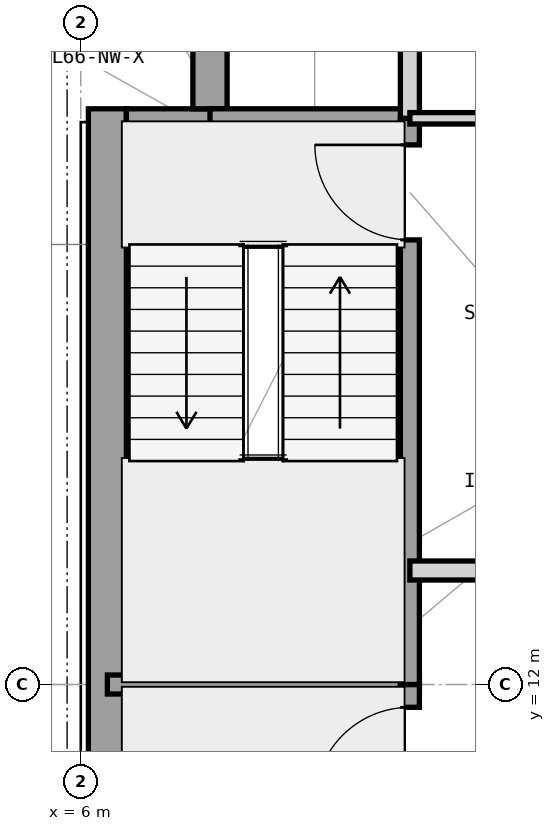
"""IFC4 building model, lengths in metres.
Left out: names, types, materials, properties, quantities, classifications, styles, units other than length and angle.
Written with IfcOpenShell. Run it as: python <this file> out.ifc"""

import sys

from ifc_helpers import new_model, si_unit, direction, frame, frame_2d, origin, place, context, subcontext, project, spatial, rectangle, extrude, element, fill, save


model = new_model("IFC4")
c1 = context("Model", 3, precision=1e-05, world=origin(), true_north=direction((0.0, 1.0)))
c2 = subcontext(c1, "Body", "Model", "MODEL_VIEW")
j1 = project(units=[si_unit("LENGTHUNIT", "METRE"), si_unit("PLANEANGLEUNIT", "RADIAN")], contexts=[c1])
p1 = place(None, origin())
s1 = spatial("IfcSite", under=j1, at=p1, CompositionType="ELEMENT")
p2 = place(p1, origin())
s2 = spatial("IfcBuilding", under=s1, at=p2, CompositionType="ELEMENT")
p3 = place(p2, frame((0.0, 0.0, 270.3)))
s3 = spatial("IfcBuildingStorey", under=s2, at=p3, CompositionType="ELEMENT", Elevation=270.3)
p4 = place(p3, frame((6.35, 4.425, 0.0), z_axis=(0.0, 0.0, 1.0), x_axis=(0.0, 1.0, 0.0)))
e1 = element("IfcWall", 1, at=p4, inside=s3, PredefinedType="SHEAR", context=c2, shape_type="SweptSolid", body=[
    extrude(rectangle(XDim=15.15, YDim=0.5, at=frame_2d((7.575, 0.0))), origin(), (0.0, 0.0, 1.0), 3.9),
])
p5 = place(p3, frame((6.6, 19.35, 0.0), z_axis=(0.0, 0.0, 1.0), x_axis=(1.0, 0.0, 0.0)))
e2 = element("IfcWall", 2, at=p5, inside=s3, PredefinedType="SHEAR", context=c2, shape_type="SweptSolid", body=[
    extrude(rectangle(XDim=1.325, YDim=0.45, at=frame_2d((0.663, 0.0))), origin(), (0.0, 0.0, 1.0), 3.9),
])
p6 = place(p3, frame((7.7, 19.575, 0.0), z_axis=(0.0, 0.0, 1.0), x_axis=(0.0, 1.0, 0.0)))
e3 = element("IfcWall", 3, at=p6, inside=s3, PredefinedType="SHEAR", context=c2, shape_type="SweptSolid", body=[
    extrude(rectangle(XDim=0.825, YDim=0.45, at=frame_2d((0.413, 0.0))), origin(), (0.0, 0.0, 1.0), 3.9),
])
p7 = place(p3, frame((6.35, 12.0, 0.0), z_axis=(0.0, 0.0, 1.0), x_axis=(1.0, 0.0, 0.0)))
e4 = element("IfcWall", 4, at=p7, inside=s3, PredefinedType="SHEAR", context=c2, shape_type="SweptSolid", body=[
    extrude(rectangle(XDim=4.105, YDim=0.25, at=frame_2d((2.052, 0.0))), origin(), (0.0, 0.0, 1.0), 3.9),
])
p8 = place(p3, frame((7.7, 19.45, 0.0), z_axis=(0.0, 0.0, 1.0), x_axis=(1.0, 0.0, 0.0)))
e5 = element("IfcWall", 5, at=p8, inside=s3, PredefinedType="SHEAR", context=c2, shape_type="SweptSolid", body=[
    extrude(rectangle(XDim=2.755, YDim=0.25, at=frame_2d((1.377, 0.0))), origin(), (0.0, 0.0, 1.0), 3.9),
])
p9 = place(p3, frame((10.33, 4.55, 0.0), z_axis=(0.0, 0.0, 1.0), x_axis=(0.0, 1.0, 0.0)))
e6 = element("IfcWall", 6, at=p9, inside=s3, PredefinedType="SHEAR", context=c2, shape_type="SweptSolid", body=[
    extrude(rectangle(XDim=7.45, YDim=0.25, at=frame_2d((3.725, 0.0))), origin(), (0.0, 0.0, 1.0), 3.9),
])
p10 = place(p9, frame((5.9, 0.0, 0.0)))
e7 = element("IfcOpeningElement", 7, at=p10, cuts=e6, PredefinedType="OPENING", context=c2, shape_type="SweptSolid", body=[
    extrude(rectangle(XDim=1.25, YDim=2.2, at=frame_2d((0.625, 1.1))), frame((0.0, 0.135, 0.0), z_axis=(0.0, -1.0, 0.0), x_axis=(1.0, 0.0, 0.0)), (0.0, 0.0, 1.0), 0.27),
])
p11 = place(p3, frame((10.33, 12.0, 0.0), z_axis=(0.0, 0.0, 1.0), x_axis=(0.0, 1.0, 0.0)))
e8 = element("IfcWall", 8, at=p11, inside=s3, PredefinedType="SHEAR", context=c2, shape_type="SweptSolid", body=[
    extrude(rectangle(XDim=7.45, YDim=0.25, at=frame_2d((3.725, 0.0))), origin(), (0.0, 0.0, 1.0), 3.9),
])
p12 = place(p11, frame((5.85, 0.0, 0.0)))
e9 = element("IfcOpeningElement", 9, at=p12, cuts=e8, PredefinedType="OPENING", context=c2, shape_type="SweptSolid", body=[
    extrude(rectangle(XDim=1.25, YDim=2.2, at=frame_2d((0.625, 1.1))), frame((0.0, 0.135, 0.0), z_axis=(0.0, -1.0, 0.0), x_axis=(1.0, 0.0, 0.0)), (0.0, 0.0, 1.0), 0.27),
])
p13 = place(p3, frame((10.33, 19.45, 0.0), z_axis=(0.0, 0.0, 1.0), x_axis=(0.0, 1.0, 0.0)))
e10 = element("IfcWall", 10, at=p13, inside=s3, PredefinedType="PARTITIONING", context=c2, shape_type="SweptSolid", body=[
    extrude(rectangle(XDim=1.2, YDim=0.25, at=frame_2d((0.6, 0.0))), origin(), (0.0, 0.0, 1.0), 3.705),
])
p14 = place(p3, frame((10.33, 13.5, 0.0), z_axis=(0.0, 0.0, 1.0), x_axis=(1.0, 0.0, 0.0)))
e11 = element("IfcWall", 11, at=p14, inside=s3, PredefinedType="PARTITIONING", context=c2, shape_type="SweptSolid", body=[
    extrude(rectangle(XDim=1.62, YDim=0.25, at=frame_2d((0.81, 0.0))), origin(), (0.0, 0.0, 1.0), 3.088),
])
p15 = place(p3, frame((10.33, 19.45, 0.0), z_axis=(0.0, 0.0, 1.0), x_axis=(1.0, 0.0, 0.0)))
e12 = element("IfcWall", 12, at=p15, inside=s3, PredefinedType="PARTITIONING", context=c2, shape_type="SweptSolid", body=[
    extrude(rectangle(XDim=3.82, YDim=0.15, at=frame_2d((1.91, 0.0))), origin(), (0.0, 0.0, 1.0), 3.705),
])
p16 = place(p15, frame((1.25, 0.0, 0.0)))
e13 = element("IfcOpeningElement", 13, at=p16, cuts=e12, PredefinedType="OPENING", context=c2, shape_type="SweptSolid", body=[
    extrude(rectangle(XDim=0.95, YDim=2.1, at=frame_2d((0.475, 1.05))), frame((0.0, 0.085, 0.0), z_axis=(0.0, -1.0, 0.0), x_axis=(1.0, 0.0, 0.0)), (0.0, 0.0, 1.0), 0.17),
])
p17 = place(p10, origin())
e14 = element("IfcDoor", 14, at=p17, inside=s3, OperationType="SINGLE_SWING_LEFT", PredefinedType="DOOR", context=c2, shape_type="SweptSolid", body=[
    extrude(rectangle(XDim=1.25, YDim=2.2, at=frame_2d((0.625, 1.1))), frame((0.0, 0.025, 0.0), z_axis=(0.0, -1.0, 0.0), x_axis=(1.0, 0.0, 0.0)), (0.0, 0.0, 1.0), 0.05),
])
fill(e7, e14)
p18 = place(p12, origin())
e15 = element("IfcDoor", 15, at=p18, inside=s3, OperationType="SINGLE_SWING_RIGHT", PredefinedType="DOOR", context=c2, shape_type="SweptSolid", body=[
    extrude(rectangle(XDim=1.25, YDim=2.2, at=frame_2d((0.625, 1.1))), frame((0.0, 0.025, 0.0), z_axis=(0.0, -1.0, 0.0), x_axis=(1.0, 0.0, 0.0)), (0.0, 0.0, 1.0), 0.05),
])
fill(e9, e15)
save(model, sys.argv[1])
